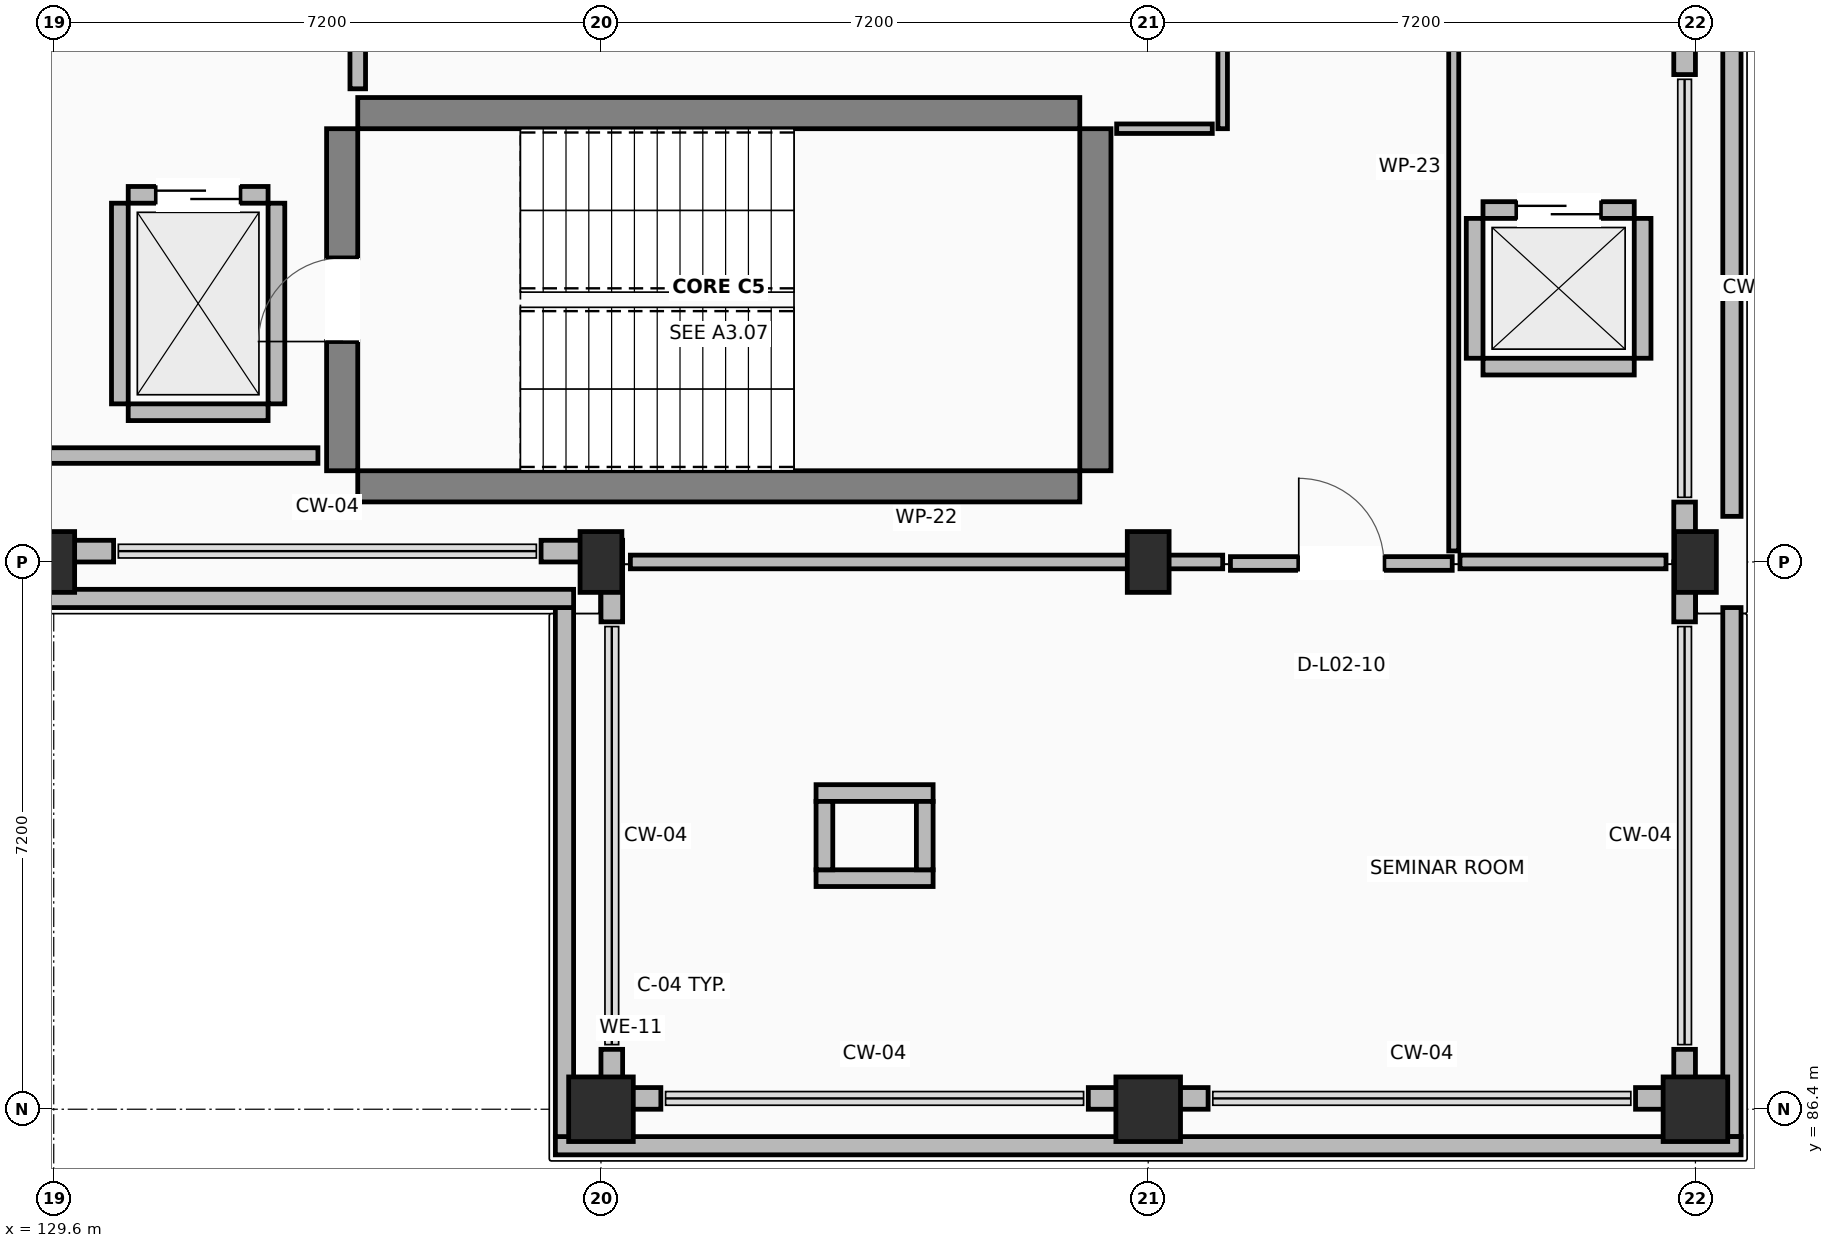
"""IFC4 building model, lengths in metres.
Left out: names, types, materials, properties, quantities, classifications, styles, units other than length and angle.
Written with IfcOpenShell. Run it as: python <this file> out.ifc"""

import sys

from ifc_helpers import new_model, si_unit, direction, frame, frame_2d, origin, origin_2d, place, context, subcontext, project, spatial, rectangle, extrude, element, fill, save


model = new_model("IFC4")
c1 = context("Model", 3, precision=1e-05, world=origin(), true_north=direction((0.0, 1.0)))
c2 = subcontext(c1, "Body", "Model", "MODEL_VIEW")
j1 = project(units=[si_unit("LENGTHUNIT", "METRE"), si_unit("PLANEANGLEUNIT", "RADIAN")], contexts=[c1])
p1 = place(None, origin())
s1 = spatial("IfcSite", under=j1, at=p1, CompositionType="ELEMENT")
p2 = place(p1, origin())
s2 = spatial("IfcBuilding", under=s1, at=p2, CompositionType="ELEMENT")
p3 = place(p2, frame((0.0, 0.0, 9.0)))
s3 = spatial("IfcBuildingStorey", under=s2, at=p3, CompositionType="ELEMENT", Elevation=9.0)
p4 = place(p3, frame((129.6, 93.6, 0.0), z_axis=(0.0, 0.0, 1.0), x_axis=(1.0, 0.0, 0.0)))
e1 = element("IfcColumn", 1, at=p4, inside=s3, PredefinedType="COLUMN", context=c2, shape_type="SweptSolid", body=[
    extrude(rectangle(XDim=0.55, YDim=0.8, at=origin_2d()), origin(), (0.0, 0.0, 1.0), 4.22),
])
p5 = place(p3, frame((136.8, 86.4, 0.0), z_axis=(0.0, 0.0, 1.0), x_axis=(1.0, 0.0, 0.0)))
e2 = element("IfcColumn", 2, at=p5, inside=s3, PredefinedType="COLUMN", context=c2, shape_type="SweptSolid", body=[
    extrude(rectangle(XDim=0.85, YDim=0.85, at=origin_2d()), origin(), (0.0, 0.0, 1.0), 4.22),
])
p6 = place(p3, frame((136.8, 93.6, 0.0), z_axis=(0.0, 0.0, 1.0), x_axis=(1.0, 0.0, 0.0)))
e3 = element("IfcColumn", 3, at=p6, inside=s3, PredefinedType="COLUMN", context=c2, shape_type="SweptSolid", body=[
    extrude(rectangle(XDim=0.55, YDim=0.8, at=origin_2d()), origin(), (0.0, 0.0, 1.0), 4.22),
])
p7 = place(p3, frame((144.0, 86.4, 0.0), z_axis=(0.0, 0.0, 1.0), x_axis=(1.0, 0.0, 0.0)))
e4 = element("IfcColumn", 4, at=p7, inside=s3, PredefinedType="COLUMN", context=c2, shape_type="SweptSolid", body=[
    extrude(rectangle(XDim=0.85, YDim=0.85, at=origin_2d()), origin(), (0.0, 0.0, 1.0), 4.22),
])
p8 = place(p3, frame((144.0, 93.6, 0.0), z_axis=(0.0, 0.0, 1.0), x_axis=(1.0, 0.0, 0.0)))
e5 = element("IfcColumn", 5, at=p8, inside=s3, PredefinedType="COLUMN", context=c2, shape_type="SweptSolid", body=[
    extrude(rectangle(XDim=0.55, YDim=0.8, at=origin_2d()), origin(), (0.0, 0.0, 1.0), 4.22),
])
p9 = place(p3, frame((151.2, 86.4, 0.0), z_axis=(0.0, 0.0, 1.0), x_axis=(1.0, 0.0, 0.0)))
e6 = element("IfcColumn", 6, at=p9, inside=s3, PredefinedType="COLUMN", context=c2, shape_type="SweptSolid", body=[
    extrude(rectangle(XDim=0.85, YDim=0.85, at=origin_2d()), origin(), (0.0, 0.0, 1.0), 4.22),
])
p10 = place(p3, frame((151.2, 93.6, 0.0), z_axis=(0.0, 0.0, 1.0), x_axis=(1.0, 0.0, 0.0)))
e7 = element("IfcColumn", 7, at=p10, inside=s3, PredefinedType="COLUMN", context=c2, shape_type="SweptSolid", body=[
    extrude(rectangle(XDim=0.55, YDim=0.8, at=origin_2d()), origin(), (0.0, 0.0, 1.0), 4.22),
])
for number, where, z_axis, x_axis in (
    (8, (133.6, 94.595, 0.0), (0.0, 0.0, 1.0), (1.0, 0.0, 0.0)),
    (9, (133.6, 99.505, 0.0), (0.0, 0.0, 1.0), (1.0, 0.0, 0.0)),
):
    element("IfcWall", number, at=place(p3, frame(where, z_axis=z_axis, x_axis=x_axis)), inside=s3, PredefinedType="SHEAR", context=c2, shape_type="SweptSolid", body=[
        extrude(rectangle(XDim=9.5, YDim=0.41, at=frame_2d((4.75, 0.0))), origin(), (0.0, 0.0, 1.0), 4.22),
    ])
p11 = place(p3, frame((133.395, 94.8, 0.0), z_axis=(0.0, 0.0, 1.0), x_axis=(0.0, 1.0, 0.0)))
e10 = element("IfcWall", 10, at=p11, inside=s3, PredefinedType="SHEAR", context=c2, shape_type="SweptSolid", body=[
    extrude(rectangle(XDim=4.5, YDim=0.41, at=frame_2d((2.25, 0.0))), origin(), (0.0, 0.0, 1.0), 4.22),
])
p12 = place(p11, frame((1.7, 0.0, 0.0)))
e11 = element("IfcOpeningElement", 11, at=p12, cuts=e10, PredefinedType="OPENING", context=c2, shape_type="SweptSolid", body=[
    extrude(rectangle(XDim=1.1, YDim=2.15, at=frame_2d((0.55, 1.075))), frame((0.0, 0.215, 0.0), z_axis=(0.0, -1.0, 0.0), x_axis=(1.0, 0.0, 0.0)), (0.0, 0.0, 1.0), 0.43),
])
p13 = place(p3, frame((143.305, 94.8, 0.0), z_axis=(0.0, 0.0, 1.0), x_axis=(0.0, 1.0, 0.0)))
e12 = element("IfcWall", 12, at=p13, inside=s3, PredefinedType="SHEAR", context=c2, shape_type="SweptSolid", body=[
    extrude(rectangle(XDim=4.5, YDim=0.41, at=frame_2d((2.25, 0.0))), origin(), (0.0, 0.0, 1.0), 4.22),
])
p14 = place(p3, frame((136.8, 86.542, 0.0), z_axis=(0.0, 0.0, 1.0), x_axis=(1.0, 0.0, 0.0)))
e13 = element("IfcWall", 13, at=p14, inside=s3, PredefinedType="STANDARD", context=c2, shape_type="SweptSolid", body=[
    extrude(rectangle(XDim=0.788, YDim=0.285, at=frame_2d((0.394, 0.0))), origin(), (0.0, 0.0, 1.0), 3.26),
])
p15 = place(p3, frame((143.212, 86.542, 0.0), z_axis=(0.0, 0.0, 1.0), x_axis=(1.0, 0.0, 0.0)))
e14 = element("IfcWall", 14, at=p15, inside=s3, PredefinedType="STANDARD", context=c2, shape_type="SweptSolid", body=[
    extrude(rectangle(XDim=1.576, YDim=0.285, at=frame_2d((0.788, 0.0))), origin(), (0.0, 0.0, 1.0), 3.26),
])
p16 = place(p3, frame((150.412, 86.542, 0.0), z_axis=(0.0, 0.0, 1.0), x_axis=(1.0, 0.0, 0.0)))
e15 = element("IfcWall", 15, at=p16, inside=s3, PredefinedType="STANDARD", context=c2, shape_type="SweptSolid", body=[
    extrude(rectangle(XDim=0.788, YDim=0.285, at=frame_2d((0.394, 0.0))), origin(), (0.0, 0.0, 1.0), 3.26),
])
p17 = place(p3, frame((151.058, 86.685, 0.0), z_axis=(0.0, 0.0, 1.0), x_axis=(0.0, 1.0, 0.0)))
e16 = element("IfcWall", 16, at=p17, inside=s3, PredefinedType="STANDARD", context=c2, shape_type="SweptSolid", body=[
    extrude(rectangle(XDim=0.503, YDim=0.285, at=frame_2d((0.251, 0.0))), origin(), (0.0, 0.0, 1.0), 3.26),
])
p18 = place(p3, frame((151.058, 92.812, 0.0), z_axis=(0.0, 0.0, 1.0), x_axis=(0.0, 1.0, 0.0)))
e17 = element("IfcWall", 17, at=p18, inside=s3, PredefinedType="STANDARD", context=c2, shape_type="SweptSolid", body=[
    extrude(rectangle(XDim=0.788, YDim=0.285, at=frame_2d((0.394, 0.0))), origin(), (0.0, 0.0, 1.0), 3.26),
])
p19 = place(p3, frame((151.058, 93.6, 0.0), z_axis=(0.0, 0.0, 1.0), x_axis=(0.0, 1.0, 0.0)))
e18 = element("IfcWall", 18, at=p19, inside=s3, PredefinedType="STANDARD", context=c2, shape_type="SweptSolid", body=[
    extrude(rectangle(XDim=0.788, YDim=0.285, at=frame_2d((0.394, 0.0))), origin(), (0.0, 0.0, 1.0), 3.26),
])
for number, where, z_axis, x_axis in (
    (19, (151.058, 100.012, 0.0), (0.0, 0.0, 1.0), (0.0, 1.0, 0.0)),
    (20, (128.812, 93.742, 0.0), (0.0, 0.0, 1.0), (1.0, 0.0, 0.0)),
):
    element("IfcWall", number, at=place(p3, frame(where, z_axis=z_axis, x_axis=x_axis)), inside=s3, PredefinedType="STANDARD", context=c2, shape_type="SweptSolid", body=[
        extrude(rectangle(XDim=1.576, YDim=0.285, at=frame_2d((0.788, 0.0))), origin(), (0.0, 0.0, 1.0), 3.26),
    ])
p20 = place(p3, frame((136.012, 93.742, 0.0), z_axis=(0.0, 0.0, 1.0), x_axis=(1.0, 0.0, 0.0)))
e21 = element("IfcWall", 21, at=p20, inside=s3, PredefinedType="STANDARD", context=c2, shape_type="SweptSolid", body=[
    extrude(rectangle(XDim=0.788, YDim=0.285, at=frame_2d((0.394, 0.0))), origin(), (0.0, 0.0, 1.0), 3.26),
])
p21 = place(p3, frame((136.942, 93.885, 0.0), z_axis=(0.0, 0.0, 1.0), x_axis=(0.0, -1.0, 0.0)))
e22 = element("IfcWall", 22, at=p21, inside=s3, PredefinedType="STANDARD", context=c2, shape_type="SweptSolid", body=[
    extrude(rectangle(XDim=1.073, YDim=0.285, at=frame_2d((0.537, 0.0))), origin(), (0.0, 0.0, 1.0), 3.26),
])
p22 = place(p3, frame((136.942, 87.188, 0.0), z_axis=(0.0, 0.0, 1.0), x_axis=(0.0, -1.0, 0.0)))
e23 = element("IfcWall", 23, at=p22, inside=s3, PredefinedType="STANDARD", context=c2, shape_type="SweptSolid", body=[
    extrude(rectangle(XDim=0.503, YDim=0.285, at=frame_2d((0.251, 0.0))), origin(), (0.0, 0.0, 1.0), 3.26),
])
p23 = place(p3, frame((151.68, 115.56, 0.0), z_axis=(0.0, 0.0, 1.0), x_axis=(0.0, -1.0, 0.0)))
e24 = element("IfcWall", 24, at=p23, inside=s3, PredefinedType="PARAPET", context=c2, shape_type="SweptSolid", body=[
    extrude(rectangle(XDim=21.36, YDim=0.24, at=frame_2d((10.68, 0.0))), origin(), (0.0, 0.0, 1.0), 1.12),
])
p24 = place(p3, frame((151.68, 93.0, 0.0), z_axis=(0.0, 0.0, 1.0), x_axis=(0.0, -1.0, 0.0)))
e25 = element("IfcWall", 25, at=p24, inside=s3, PredefinedType="PARAPET", context=c2, shape_type="SweptSolid", body=[
    extrude(rectangle(XDim=6.96, YDim=0.24, at=frame_2d((3.48, 0.0))), origin(), (0.0, 0.0, 1.0), 1.12),
])
p25 = place(p3, frame((151.8, 85.92, 0.0), z_axis=(0.0, 0.0, 1.0), x_axis=(-1.0, 0.0, 0.0)))
e26 = element("IfcWall", 26, at=p25, inside=s3, PredefinedType="PARAPET", context=c2, shape_type="SweptSolid", body=[
    extrude(rectangle(XDim=15.6, YDim=0.24, at=frame_2d((7.8, 0.0))), origin(), (0.0, 0.0, 1.0), 1.12),
])
p26 = place(p3, frame((136.32, 86.04, 0.0), z_axis=(0.0, 0.0, 1.0), x_axis=(0.0, 1.0, 0.0)))
e27 = element("IfcWall", 27, at=p26, inside=s3, PredefinedType="PARAPET", context=c2, shape_type="SweptSolid", body=[
    extrude(rectangle(XDim=6.96, YDim=0.24, at=frame_2d((3.48, 0.0))), origin(), (0.0, 0.0, 1.0), 1.12),
])
p27 = place(p3, frame((136.44, 93.12, 0.0), z_axis=(0.0, 0.0, 1.0), x_axis=(-1.0, 0.0, 0.0)))
e28 = element("IfcWall", 28, at=p27, inside=s3, PredefinedType="PARAPET", context=c2, shape_type="SweptSolid", body=[
    extrude(rectangle(XDim=57.84, YDim=0.24, at=frame_2d((28.92, 0.0))), origin(), (0.0, 0.0, 1.0), 1.12),
])
p28 = place(p3, frame((130.58, 95.57, 0.0), z_axis=(0.0, 0.0, 1.0), x_axis=(1.0, 0.0, 0.0)))
e29 = element("IfcWall", 29, at=p28, inside=s3, PredefinedType="STANDARD", context=c2, shape_type="SweptSolid", body=[
    extrude(rectangle(XDim=1.84, YDim=0.22, at=frame_2d((0.92, 0.0))), origin(), (0.0, 0.0, 1.0), 3.26),
])
p29 = place(p3, frame((130.58, 98.43, 0.0), z_axis=(0.0, 0.0, 1.0), x_axis=(1.0, 0.0, 0.0)))
e30 = element("IfcWall", 30, at=p29, inside=s3, PredefinedType="STANDARD", context=c2, shape_type="SweptSolid", body=[
    extrude(rectangle(XDim=1.84, YDim=0.22, at=frame_2d((0.92, 0.0))), origin(), (0.0, 0.0, 1.0), 3.26),
])
p30 = place(p29, frame((0.37, 0.0, 0.0)))
e31 = element("IfcOpeningElement", 31, at=p30, cuts=e30, PredefinedType="OPENING", context=c2, shape_type="SweptSolid", body=[
    extrude(rectangle(XDim=1.1, YDim=2.15, at=frame_2d((0.55, 1.075))), frame((0.0, 0.12, 0.0), z_axis=(0.0, -1.0, 0.0), x_axis=(1.0, 0.0, 0.0)), (0.0, 0.0, 1.0), 0.24),
])
for number, where, z_axis, x_axis in (
    (32, (130.47, 95.68, 0.0), (0.0, 0.0, 1.0), (0.0, 1.0, 0.0)),
    (33, (132.53, 95.68, 0.0), (0.0, 0.0, 1.0), (0.0, 1.0, 0.0)),
):
    element("IfcWall", number, at=place(p3, frame(where, z_axis=z_axis, x_axis=x_axis)), inside=s3, PredefinedType="STANDARD", context=c2, shape_type="SweptSolid", body=[
        extrude(rectangle(XDim=2.64, YDim=0.22, at=frame_2d((1.32, 0.0))), origin(), (0.0, 0.0, 1.0), 3.26),
    ])
p31 = place(p3, frame((148.405, 96.17, 0.0), z_axis=(0.0, 0.0, 1.0), x_axis=(1.0, 0.0, 0.0)))
e34 = element("IfcWall", 34, at=p31, inside=s3, PredefinedType="STANDARD", context=c2, shape_type="SweptSolid", body=[
    extrude(rectangle(XDim=1.99, YDim=0.22, at=frame_2d((0.995, 0.0))), origin(), (0.0, 0.0, 1.0), 3.26),
])
p32 = place(p3, frame((148.405, 98.23, 0.0), z_axis=(0.0, 0.0, 1.0), x_axis=(1.0, 0.0, 0.0)))
e35 = element("IfcWall", 35, at=p32, inside=s3, PredefinedType="STANDARD", context=c2, shape_type="SweptSolid", body=[
    extrude(rectangle(XDim=1.99, YDim=0.22, at=frame_2d((0.995, 0.0))), origin(), (0.0, 0.0, 1.0), 3.26),
])
p33 = place(p32, frame((0.445, 0.0, 0.0)))
e36 = element("IfcOpeningElement", 36, at=p33, cuts=e35, PredefinedType="OPENING", context=c2, shape_type="SweptSolid", body=[
    extrude(rectangle(XDim=1.1, YDim=2.15, at=frame_2d((0.55, 1.075))), frame((0.0, 0.12, 0.0), z_axis=(0.0, -1.0, 0.0), x_axis=(1.0, 0.0, 0.0)), (0.0, 0.0, 1.0), 0.24),
])
for number, where, z_axis, x_axis in (
    (37, (148.295, 96.28, 0.0), (0.0, 0.0, 1.0), (0.0, 1.0, 0.0)),
    (38, (150.505, 96.28, 0.0), (0.0, 0.0, 1.0), (0.0, 1.0, 0.0)),
):
    element("IfcWall", number, at=place(p3, frame(where, z_axis=z_axis, x_axis=x_axis)), inside=s3, PredefinedType="STANDARD", context=c2, shape_type="SweptSolid", body=[
        extrude(rectangle(XDim=1.84, YDim=0.22, at=frame_2d((0.92, 0.0))), origin(), (0.0, 0.0, 1.0), 3.26),
    ])
for number, where, z_axis, x_axis in (
    (39, (139.63, 89.44, 0.0), (0.0, 0.0, 1.0), (1.0, 0.0, 0.0)),
    (40, (139.63, 90.56, 0.0), (0.0, 0.0, 1.0), (1.0, 0.0, 0.0)),
):
    element("IfcWall", number, at=place(p3, frame(where, z_axis=z_axis, x_axis=x_axis)), inside=s3, PredefinedType="STANDARD", context=c2, shape_type="SweptSolid", body=[
        extrude(rectangle(XDim=1.54, YDim=0.22, at=frame_2d((0.77, 0.0))), origin(), (0.0, 0.0, 1.0), 3.26),
    ])
for number, where, z_axis, x_axis in (
    (41, (139.74, 89.55, 0.0), (0.0, 0.0, 1.0), (0.0, 1.0, 0.0)),
    (42, (141.06, 89.55, 0.0), (0.0, 0.0, 1.0), (0.0, 1.0, 0.0)),
):
    element("IfcWall", number, at=place(p3, frame(where, z_axis=z_axis, x_axis=x_axis)), inside=s3, PredefinedType="STANDARD", context=c2, shape_type="SweptSolid", body=[
        extrude(rectangle(XDim=0.9, YDim=0.22, at=frame_2d((0.45, 0.0))), origin(), (0.0, 0.0, 1.0), 3.26),
    ])
p34 = place(p3, frame((133.6, 103.783, 0.0), z_axis=(0.0, 0.0, 1.0), x_axis=(0.0, -1.0, 0.0)))
e43 = element("IfcWall", 43, at=p34, inside=s3, PredefinedType="PARTITIONING", context=c2, shape_type="SweptSolid", body=[
    extrude(rectangle(XDim=3.958, YDim=0.205, at=frame_2d((1.979, 0.0))), origin(), (0.0, 0.0, 1.0), 3.26),
])
p35 = place(p3, frame((133.076, 95.0, 0.0), z_axis=(0.0, 0.0, 1.0), x_axis=(-1.0, 0.0, 0.0)))
e44 = element("IfcWall", 44, at=p35, inside=s3, PredefinedType="PARTITIONING", context=c2, shape_type="SweptSolid", body=[
    extrude(rectangle(XDim=3.676, YDim=0.205, at=frame_2d((1.838, 0.0))), origin(), (0.0, 0.0, 1.0), 3.26),
])
p36 = place(p3, frame((137.187, 93.6, 0.0), z_axis=(0.0, 0.0, 1.0), x_axis=(1.0, 0.0, 0.0)))
e45 = element("IfcWall", 45, at=p36, inside=s3, PredefinedType="PARTITIONING", context=c2, shape_type="SweptSolid", body=[
    extrude(rectangle(XDim=7.793, YDim=0.18, at=frame_2d((3.896, 0.0))), origin(), (0.0, 0.0, 1.0), 3.26),
])
p37 = place(p3, frame((145.082, 93.58, 0.0), z_axis=(0.0, 0.0, 1.0), x_axis=(1.0, 0.0, 0.0)))
e46 = element("IfcWall", 46, at=p37, inside=s3, PredefinedType="PARTITIONING", context=c2, shape_type="SweptSolid", body=[
    extrude(rectangle(XDim=2.918, YDim=0.18, at=frame_2d((1.459, 0.0))), origin(), (0.0, 0.0, 1.0), 3.26),
])
p38 = place(p37, frame((0.899, 0.0, 0.0)))
e47 = element("IfcOpeningElement", 47, at=p38, cuts=e46, PredefinedType="OPENING", context=c2, shape_type="SweptSolid", body=[
    extrude(rectangle(XDim=1.12, YDim=2.15, at=frame_2d((0.56, 1.075))), frame((0.0, 0.1, 0.0), z_axis=(0.0, -1.0, 0.0), x_axis=(1.0, 0.0, 0.0)), (0.0, 0.0, 1.0), 0.2),
])
p39 = place(p3, frame((148.102, 93.6, 0.0), z_axis=(0.0, 0.0, 1.0), x_axis=(1.0, 0.0, 0.0)))
e48 = element("IfcWall", 48, at=p39, inside=s3, PredefinedType="PARTITIONING", context=c2, shape_type="SweptSolid", body=[
    extrude(rectangle(XDim=2.711, YDim=0.18, at=frame_2d((1.355, 0.0))), origin(), (0.0, 0.0, 1.0), 3.26),
])
p40 = place(p3, frame((144.98, 103.843, 0.0), z_axis=(0.0, 0.0, 1.0), x_axis=(0.0, -1.0, 0.0)))
e49 = element("IfcWall", 49, at=p40, inside=s3, PredefinedType="PARTITIONING", context=c2, shape_type="SweptSolid", body=[
    extrude(rectangle(XDim=4.543, YDim=0.125, at=frame_2d((2.271, 0.0))), origin(), (0.0, 0.0, 1.0), 3.26),
])
p41 = place(p3, frame((144.843, 99.3, 0.0), z_axis=(0.0, 0.0, 1.0), x_axis=(-1.0, 0.0, 0.0)))
e50 = element("IfcWall", 50, at=p41, inside=s3, PredefinedType="PARTITIONING", context=c2, shape_type="SweptSolid", body=[
    extrude(rectangle(XDim=1.258, YDim=0.125, at=frame_2d((0.629, 0.0))), origin(), (0.0, 0.0, 1.0), 3.26),
])
p42 = place(p3, frame((148.02, 93.745, 0.0), z_axis=(0.0, 0.0, 1.0), x_axis=(0.0, 1.0, 0.0)))
e51 = element("IfcWall", 51, at=p42, inside=s3, PredefinedType="PARTITIONING", context=c2, shape_type="SweptSolid", body=[
    extrude(rectangle(XDim=10.091, YDim=0.132, at=frame_2d((5.045, 0.0))), origin(), (0.0, 0.0, 1.0), 3.26),
])
p43 = place(p12, origin())
e52 = element("IfcDoor", 52, at=p43, inside=s3, OperationType="SINGLE_SWING_LEFT", PredefinedType="DOOR", context=c2, shape_type="SweptSolid", body=[
    extrude(rectangle(XDim=1.1, YDim=2.15, at=frame_2d((0.55, 1.075))), frame((0.0, 0.025, 0.0), z_axis=(0.0, -1.0, 0.0), x_axis=(1.0, 0.0, 0.0)), (0.0, 0.0, 1.0), 0.05),
])
fill(e11, e52)
p44 = place(p30, origin())
e53 = element("IfcDoor", 53, at=p44, inside=s3, OperationType="SLIDING_TO_LEFT", PredefinedType="DOOR", context=c2, shape_type="SweptSolid", body=[
    extrude(rectangle(XDim=1.1, YDim=2.15, at=frame_2d((0.55, 1.075))), frame((0.0, 0.025, 0.0), z_axis=(0.0, -1.0, 0.0), x_axis=(1.0, 0.0, 0.0)), (0.0, 0.0, 1.0), 0.05),
])
fill(e31, e53)
p45 = place(p33, origin())
e54 = element("IfcDoor", 54, at=p45, inside=s3, OperationType="SLIDING_TO_LEFT", PredefinedType="DOOR", context=c2, shape_type="SweptSolid", body=[
    extrude(rectangle(XDim=1.1, YDim=2.15, at=frame_2d((0.55, 1.075))), frame((0.0, 0.025, 0.0), z_axis=(0.0, -1.0, 0.0), x_axis=(1.0, 0.0, 0.0)), (0.0, 0.0, 1.0), 0.05),
])
fill(e36, e54)
p46 = place(p38, origin())
e55 = element("IfcDoor", 55, at=p46, inside=s3, OperationType="SINGLE_SWING_LEFT", PredefinedType="DOOR", context=c2, shape_type="SweptSolid", body=[
    extrude(rectangle(XDim=1.12, YDim=2.15, at=frame_2d((0.56, 1.075))), frame((0.0, 0.025, 0.0), z_axis=(0.0, -1.0, 0.0), x_axis=(1.0, 0.0, 0.0)), (0.0, 0.0, 1.0), 0.05),
])
fill(e47, e55)
save(model, sys.argv[1])
